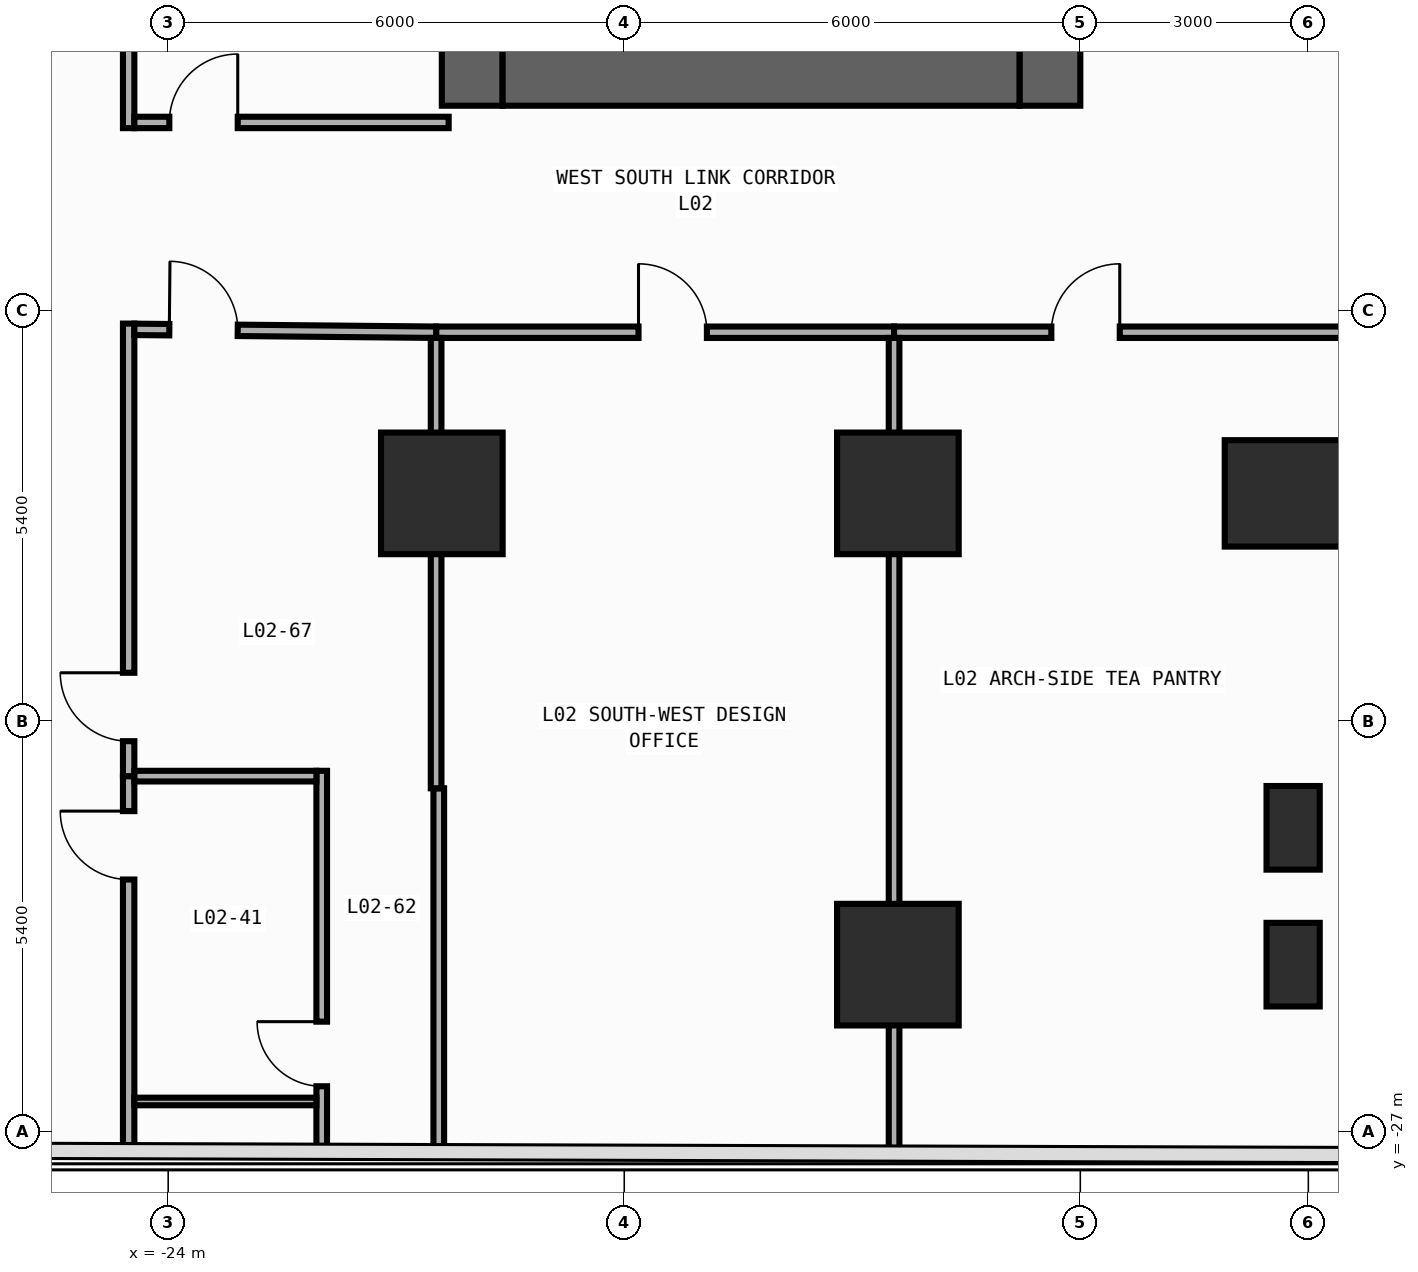
"""IFC4 building model, lengths in metres.
Left out: names, types, materials, properties, quantities, classifications, styles, units other than length and angle.
Written with IfcOpenShell. Run it as: python <this file> out.ifc"""

import sys

from ifc_helpers import new_model, si_unit, direction, frame, frame_2d, origin, origin_2d, place, context, subcontext, project, spatial, rectangle, extrude, element, fill, save


model = new_model("IFC4")
c1 = context("Model", 3, precision=1e-05, world=origin(), true_north=direction((0.0, 1.0)))
c2 = subcontext(c1, "Body", "Model", "MODEL_VIEW")
j1 = project(units=[si_unit("LENGTHUNIT", "METRE"), si_unit("PLANEANGLEUNIT", "RADIAN")], contexts=[c1])
p1 = place(None, origin())
s1 = spatial("IfcSite", under=j1, at=p1, CompositionType="ELEMENT")
p2 = place(p1, origin())
s2 = spatial("IfcBuilding", under=s1, at=p2, CompositionType="ELEMENT")
p3 = place(p2, frame((0.0, 0.0, 6.0)))
s3 = spatial("IfcBuildingStorey", under=s2, at=p3, CompositionType="ELEMENT", Elevation=6.0)
p4 = place(p3, frame((-20.0, -13.5, 0.0), z_axis=(0.0, 0.0, 1.0), x_axis=(0.0, 1.0, 0.0)))
e1 = element("IfcWall", 1, at=p4, inside=s3, PredefinedType="SHEAR", context=c2, shape_type="SweptSolid", body=[
    extrude(rectangle(XDim=27.0, YDim=0.8, at=frame_2d((13.5, 0.0))), origin(), (0.0, 0.0, 1.0), 4.7),
])
p5 = place(p3, frame((-12.4, -13.5, 0.0), z_axis=(0.0, 0.0, 1.0), x_axis=(0.0, 1.0, 0.0)))
e2 = element("IfcWall", 2, at=p5, inside=s3, PredefinedType="SHEAR", context=c2, shape_type="SweptSolid", body=[
    extrude(rectangle(XDim=27.0, YDim=0.8, at=frame_2d((13.5, 0.0))), origin(), (0.0, 0.0, 1.0), 4.7),
])
p6 = place(p5, frame((21.55, 0.0, 0.0)))
e3 = element("IfcOpeningElement", 3, at=p6, cuts=e2, PredefinedType="OPENING", context=c2, shape_type="SweptSolid", body=[
    extrude(rectangle(XDim=1.1, YDim=2.2, at=frame_2d((0.55, 1.1))), frame((0.0, 0.41, 0.0), z_axis=(0.0, -1.0, 0.0), x_axis=(1.0, 0.0, 0.0)), (0.0, 0.0, 1.0), 0.82),
])
p7 = place(p5, frame((18.35, 0.0, 0.0)))
e4 = element("IfcOpeningElement", 4, at=p7, cuts=e2, PredefinedType="OPENING", context=c2, shape_type="SweptSolid", body=[
    extrude(rectangle(XDim=1.1, YDim=2.2, at=frame_2d((0.55, 1.1))), frame((0.0, 0.41, 0.0), z_axis=(0.0, -1.0, 0.0), x_axis=(1.0, 0.0, 0.0)), (0.0, 0.0, 1.0), 0.82),
])
p8 = place(p5, frame((15.15, 0.0, 0.0)))
e5 = element("IfcOpeningElement", 5, at=p8, cuts=e2, PredefinedType="OPENING", context=c2, shape_type="SweptSolid", body=[
    extrude(rectangle(XDim=1.1, YDim=2.2, at=frame_2d((0.55, 1.1))), frame((0.0, 0.41, 0.0), z_axis=(0.0, -1.0, 0.0), x_axis=(1.0, 0.0, 0.0)), (0.0, 0.0, 1.0), 0.82),
])
p9 = place(p5, frame((10.35, 0.0, 0.0)))
e6 = element("IfcOpeningElement", 6, at=p9, cuts=e2, PredefinedType="OPENING", context=c2, shape_type="SweptSolid", body=[
    extrude(rectangle(XDim=1.1, YDim=2.2, at=frame_2d((0.55, 1.1))), frame((0.0, 0.41, 0.0), z_axis=(0.0, -1.0, 0.0), x_axis=(1.0, 0.0, 0.0)), (0.0, 0.0, 1.0), 0.82),
])
p10 = place(p5, frame((7.15, 0.0, 0.0)))
e7 = element("IfcOpeningElement", 7, at=p10, cuts=e2, PredefinedType="OPENING", context=c2, shape_type="SweptSolid", body=[
    extrude(rectangle(XDim=1.1, YDim=2.2, at=frame_2d((0.55, 1.1))), frame((0.0, 0.41, 0.0), z_axis=(0.0, -1.0, 0.0), x_axis=(1.0, 0.0, 0.0)), (0.0, 0.0, 1.0), 0.82),
])
p11 = place(p5, frame((3.95, 0.0, 0.0)))
e8 = element("IfcOpeningElement", 8, at=p11, cuts=e2, PredefinedType="OPENING", context=c2, shape_type="SweptSolid", body=[
    extrude(rectangle(XDim=1.1, YDim=2.2, at=frame_2d((0.55, 1.1))), frame((0.0, 0.41, 0.0), z_axis=(0.0, -1.0, 0.0), x_axis=(1.0, 0.0, 0.0)), (0.0, 0.0, 1.0), 0.82),
])
p12 = place(p5, frame((12.725, 0.0, 0.0)))
e9 = element("IfcOpeningElement", 9, at=p12, cuts=e2, PredefinedType="OPENING", context=c2, shape_type="SweptSolid", body=[
    extrude(rectangle(XDim=1.15, YDim=2.2, at=frame_2d((0.575, 1.1))), frame((0.0, 0.41, 0.0), z_axis=(0.0, -1.0, 0.0), x_axis=(1.0, 0.0, 0.0)), (0.0, 0.0, 1.0), 0.82),
])
p13 = place(p5, frame((1.625, 0.0, 0.0)))
e10 = element("IfcOpeningElement", 10, at=p13, cuts=e2, PredefinedType="OPENING", context=c2, shape_type="SweptSolid", body=[
    extrude(rectangle(XDim=0.85, YDim=2.1, at=frame_2d((0.425, 1.05))), frame((0.0, 0.41, 0.0), z_axis=(0.0, -1.0, 0.0), x_axis=(1.0, 0.0, 0.0)), (0.0, 0.0, 1.0), 0.82),
])
p14 = place(p3, frame((-19.6, -13.1, 0.0), z_axis=(0.0, 0.0, 1.0), x_axis=(1.0, 0.0, 0.0)))
e11 = element("IfcWall", 11, at=p14, inside=s3, PredefinedType="SHEAR", context=c2, shape_type="SweptSolid", body=[
    extrude(rectangle(XDim=6.8, YDim=0.8, at=frame_2d((3.4, 0.0))), origin(), (0.0, 0.0, 1.0), 4.7),
])
p15 = place(p3, frame((-9.2, -18.6, 0.0), z_axis=(0.0, 0.0, 1.0), x_axis=(1.0, 0.0, 0.0)))
e12 = element("IfcColumn", 12, at=p15, inside=s3, PredefinedType="COLUMN", context=c2, shape_type="SweptSolid", body=[
    extrude(rectangle(XDim=1.8, YDim=1.4, at=origin_2d()), origin(), (0.0, 0.0, 1.0), 5.0),
])
for number, where, z_axis, x_axis in (
    (13, (-20.4, -18.6, 0.0), (0.0, 0.0, 1.0), (1.0, 0.0, 0.0)),
    (14, (-14.4, -18.6, 0.0), (0.0, 0.0, 1.0), (1.0, 0.0, 0.0)),
):
    element("IfcColumn", number, at=place(p3, frame(where, z_axis=z_axis, x_axis=x_axis)), inside=s3, PredefinedType="COLUMN", context=c2, shape_type="SweptSolid", body=[
        extrude(rectangle(XDim=1.6, YDim=1.6, at=origin_2d()), origin(), (0.0, 0.0, 1.0), 5.0),
    ])
p16 = place(p3, frame((-9.2, -24.8, 0.0), z_axis=(0.0, 0.0, 1.0), x_axis=(1.0, 0.0, 0.0)))
e15 = element("IfcColumn", 15, at=p16, inside=s3, PredefinedType="PILASTER", context=c2, shape_type="SweptSolid", body=[
    extrude(rectangle(XDim=0.7, YDim=1.1, at=origin_2d()), origin(), (0.0, 0.0, 1.0), 5.0),
])
p17 = place(p3, frame((-14.4, -24.8, 0.0), z_axis=(0.0, 0.0, 1.0), x_axis=(1.0, 0.0, 0.0)))
e16 = element("IfcColumn", 16, at=p17, inside=s3, PredefinedType="COLUMN", context=c2, shape_type="SweptSolid", body=[
    extrude(rectangle(XDim=1.6, YDim=1.6, at=origin_2d()), origin(), (0.0, 0.0, 1.0), 5.0),
])
p18 = place(p3, frame((-9.2, -23.0, 0.0), z_axis=(0.0, 0.0, 1.0), x_axis=(1.0, 0.0, 0.0)))
e17 = element("IfcColumn", 17, at=p18, inside=s3, PredefinedType="PILASTER", context=c2, shape_type="SweptSolid", body=[
    extrude(rectangle(XDim=0.7, YDim=1.1, at=origin_2d()), origin(), (0.0, 0.0, 1.0), 5.0),
])
p19 = place(p3, frame((-24.52, -27.258, 0.0), z_axis=(0.0, 0.0, 1.0), x_axis=(0.0, 1.0, 0.0)))
e18 = element("IfcWall", 18, at=p19, inside=s3, PredefinedType="PARTITIONING", context=c2, shape_type="SweptSolid", body=[
    extrude(rectangle(XDim=4.938, YDim=0.15, at=frame_2d((2.469, 0.0))), origin(), (0.0, 0.0, 1.0), 4.7),
])
p20 = place(p19, frame((3.578, 0.0, 0.0)))
e19 = element("IfcOpeningElement", 19, at=p20, cuts=e18, PredefinedType="OPENING", context=c2, shape_type="SweptSolid", body=[
    extrude(rectangle(XDim=0.9, YDim=2.15, at=frame_2d((0.45, 1.075))), frame((0.0, 0.085, 0.0), z_axis=(0.0, -1.0, 0.0), x_axis=(1.0, 0.0, 0.0)), (0.0, 0.0, 1.0), 0.17),
])
p21 = place(p3, frame((-24.52, -13.795, 0.0), z_axis=(0.0, 0.0, 1.0), x_axis=(0.0, 1.0, 0.0)))
e20 = element("IfcWall", 20, at=p21, inside=s3, PredefinedType="PARTITIONING", context=c2, shape_type="SweptSolid", body=[
    extrude(rectangle(XDim=25.23, YDim=0.15, at=frame_2d((12.615, 0.0))), origin(), (0.0, 0.0, 1.0), 4.7),
])
p22 = place(p21, frame((7.863, 0.0, 0.0)))
e21 = element("IfcOpeningElement", 21, at=p22, cuts=e20, PredefinedType="OPENING", context=c2, shape_type="SweptSolid", body=[
    extrude(rectangle(XDim=0.9, YDim=2.15, at=frame_2d((0.45, 1.075))), frame((0.0, 0.085, 0.0), z_axis=(0.0, -1.0, 0.0), x_axis=(1.0, 0.0, 0.0)), (0.0, 0.0, 1.0), 0.17),
])
p23 = place(p3, frame((-24.52, -22.32, 0.0), z_axis=(0.0, 0.0, 1.0), x_axis=(0.0, 1.0, 0.0)))
e22 = element("IfcWall", 22, at=p23, inside=s3, PredefinedType="PARTITIONING", context=c2, shape_type="SweptSolid", body=[
    extrude(rectangle(XDim=5.954, YDim=0.15, at=frame_2d((2.977, 0.0))), origin(), (0.0, 0.0, 1.0), 4.7),
])
p24 = place(p23, frame((0.46, 0.0, 0.0)))
e23 = element("IfcOpeningElement", 23, at=p24, cuts=e22, PredefinedType="OPENING", context=c2, shape_type="SweptSolid", body=[
    extrude(rectangle(XDim=0.9, YDim=2.15, at=frame_2d((0.45, 1.075))), frame((0.0, 0.085, 0.0), z_axis=(0.0, -1.0, 0.0), x_axis=(1.0, 0.0, 0.0)), (0.0, 0.0, 1.0), 0.17),
])
p25 = place(p3, frame((-24.445, -13.72, 0.0), z_axis=(0.0, 0.0, 1.0), x_axis=(1.0, 0.0, 0.0)))
e24 = element("IfcWall", 24, at=p25, inside=s3, PredefinedType="PARTITIONING", context=c2, shape_type="SweptSolid", body=[
    extrude(rectangle(XDim=4.135, YDim=0.15, at=frame_2d((2.067, 0.0))), origin(), (0.0, 0.0, 1.0), 4.7),
])
p26 = place(p25, frame((0.46, 0.0, 0.0)))
e25 = element("IfcOpeningElement", 25, at=p26, cuts=e24, PredefinedType="OPENING", context=c2, shape_type="SweptSolid", body=[
    extrude(rectangle(XDim=0.9, YDim=2.15, at=frame_2d((0.45, 1.075))), frame((0.0, 0.085, 0.0), z_axis=(0.0, -1.0, 0.0), x_axis=(1.0, 0.0, 0.0)), (0.0, 0.0, 1.0), 0.17),
])
p27 = place(p3, frame((-20.475, -16.48, 0.0), z_axis=(0.0, 0.0, 1.0), x_axis=(1.0, 0.0, 0.0)))
e26 = element("IfcWall", 26, at=p27, inside=s3, PredefinedType="PARTITIONING", context=c2, shape_type="SweptSolid", body=[
    extrude(rectangle(XDim=6.025, YDim=0.15, at=frame_2d((3.013, 0.0))), origin(), (0.0, 0.0, 1.0), 4.7),
])
p28 = place(p27, frame((2.663, 0.0, 0.0)))
e27 = element("IfcOpeningElement", 27, at=p28, cuts=e26, PredefinedType="OPENING", context=c2, shape_type="SweptSolid", body=[
    extrude(rectangle(XDim=0.9, YDim=2.15, at=frame_2d((0.45, 1.075))), frame((0.0, 0.085, 0.0), z_axis=(0.0, -1.0, 0.0), x_axis=(1.0, 0.0, 0.0)), (0.0, 0.0, 1.0), 0.17),
])
p29 = place(p3, frame((-14.45, -16.48, 0.0), z_axis=(0.0, 0.0, 1.0), x_axis=(1.0, 0.0, 0.0)))
e28 = element("IfcWall", 28, at=p29, inside=s3, PredefinedType="PARTITIONING", context=c2, shape_type="SweptSolid", body=[
    extrude(rectangle(XDim=6.245, YDim=0.15, at=frame_2d((3.123, 0.0))), origin(), (0.0, 0.0, 1.0), 4.7),
])
p30 = place(p29, frame((2.069, 0.0, 0.0)))
e29 = element("IfcOpeningElement", 29, at=p30, cuts=e28, PredefinedType="OPENING", context=c2, shape_type="SweptSolid", body=[
    extrude(rectangle(XDim=0.9, YDim=2.15, at=frame_2d((0.45, 1.075))), frame((0.0, 0.085, 0.0), z_axis=(0.0, -1.0, 0.0), x_axis=(1.0, 0.0, 0.0)), (0.0, 0.0, 1.0), 0.17),
])
p31 = place(p3, frame((-24.445, -16.442, 0.0), z_axis=(0.0, 0.0, 1.0), x_axis=(0.999954573497, -0.009531576096, 0.0)))
e30 = element("IfcWall", 30, at=p31, inside=s3, PredefinedType="PARTITIONING", context=c2, shape_type="SweptSolid", body=[
    extrude(rectangle(XDim=3.97, YDim=0.15, at=frame_2d((1.985, 0.0))), origin(), (0.0, 0.0, 1.0), 4.7),
])
p32 = place(p31, frame((0.46, 0.0, 0.0)))
e31 = element("IfcOpeningElement", 31, at=p32, cuts=e30, PredefinedType="OPENING", context=c2, shape_type="SweptSolid", body=[
    extrude(rectangle(XDim=0.9, YDim=2.15, at=frame_2d((0.45, 1.075))), frame((0.0, 0.085, 0.0), z_axis=(0.0, -1.0, 0.0), x_axis=(1.0, 0.0, 0.0)), (0.0, 0.0, 1.0), 0.17),
])
p33 = place(p3, frame((-21.98, -27.266, 0.0), z_axis=(0.0, 0.0, 1.0), x_axis=(0.0, 1.0, 0.0)))
e32 = element("IfcWall", 32, at=p33, inside=s3, PredefinedType="PARTITIONING", context=c2, shape_type="SweptSolid", body=[
    extrude(rectangle(XDim=5.016, YDim=0.14, at=frame_2d((2.508, 0.0))), origin(), (0.0, 0.0, 1.0), 4.7),
])
p34 = place(p33, frame((0.866, 0.0, 0.0)))
e33 = element("IfcOpeningElement", 33, at=p34, cuts=e32, PredefinedType="OPENING", context=c2, shape_type="SweptSolid", body=[
    extrude(rectangle(XDim=0.85, YDim=2.1, at=frame_2d((0.425, 1.05))), frame((0.0, 0.08, 0.0), z_axis=(0.0, -1.0, 0.0), x_axis=(1.0, 0.0, 0.0)), (0.0, 0.0, 1.0), 0.16),
])
p35 = place(p3, frame((-24.445, -22.32, 0.0), z_axis=(0.0, 0.0, 1.0), x_axis=(1.0, 0.0, 0.0)))
e34 = element("IfcWall", 34, at=p35, inside=s3, PredefinedType="PARTITIONING", context=c2, shape_type="SweptSolid", body=[
    extrude(rectangle(XDim=2.395, YDim=0.14, at=frame_2d((1.198, 0.0))), origin(), (0.0, 0.0, 1.0), 4.7),
])
p36 = place(p3, frame((-14.45, -27.29, 0.0), z_axis=(0.0, 0.0, 1.0), x_axis=(0.0, 1.0, 0.0)))
e35 = element("IfcWall", 35, at=p36, inside=s3, PredefinedType="PARTITIONING", context=c2, shape_type="SweptSolid", body=[
    extrude(rectangle(XDim=10.735, YDim=0.14, at=frame_2d((5.367, 0.0))), origin(), (0.0, 0.0, 1.0), 3.8),
])
p37 = place(p3, frame((-20.44, -27.271, 0.0), z_axis=(0.0, 0.0, 1.0), x_axis=(0.0, 1.0, 0.0)))
e36 = element("IfcWall", 36, at=p37, inside=s3, PredefinedType="PARTITIONING", context=c2, shape_type="SweptSolid", body=[
    extrude(rectangle(XDim=4.791, YDim=0.14, at=frame_2d((2.396, 0.0))), origin(), (0.0, 0.0, 1.0), 4.7),
])
p38 = place(p3, frame((-20.475, -22.48, 0.0), z_axis=(0.0, 0.0, 1.0), x_axis=(0.0, 1.0, 0.0)))
e37 = element("IfcWall", 37, at=p38, inside=s3, PredefinedType="PARTITIONING", context=c2, shape_type="SweptSolid", body=[
    extrude(rectangle(XDim=5.925, YDim=0.14, at=frame_2d((2.962, 0.0))), origin(), (0.0, 0.0, 1.0), 4.7),
])
p39 = place(p3, frame((-22.05, -26.6, 0.0), z_axis=(0.0, 0.0, 1.0), x_axis=(-1.0, 0.0, 0.0)))
e38 = element("IfcWall", 38, at=p39, inside=s3, PredefinedType="PARTITIONING", context=c2, shape_type="SweptSolid", body=[
    extrude(rectangle(XDim=2.395, YDim=0.1, at=frame_2d((1.198, 0.0))), origin(), (0.0, 0.0, 1.0), 4.7),
])
p40 = place(p20, origin())
e39 = element("IfcDoor", 39, at=p40, inside=s3, OperationType="SINGLE_SWING_RIGHT", PredefinedType="DOOR", context=c2, shape_type="SweptSolid", body=[
    extrude(rectangle(XDim=0.9, YDim=2.15, at=frame_2d((0.45, 1.075))), frame((0.0, 0.025, 0.0), z_axis=(0.0, -1.0, 0.0), x_axis=(1.0, 0.0, 0.0)), (0.0, 0.0, 1.0), 0.05),
])
fill(e19, e39)
p41 = place(p24, origin())
e40 = element("IfcDoor", 40, at=p41, inside=s3, OperationType="SINGLE_SWING_RIGHT", PredefinedType="DOOR", context=c2, shape_type="SweptSolid", body=[
    extrude(rectangle(XDim=0.9, YDim=2.15, at=frame_2d((0.45, 1.075))), frame((0.0, 0.025, 0.0), z_axis=(0.0, -1.0, 0.0), x_axis=(1.0, 0.0, 0.0)), (0.0, 0.0, 1.0), 0.05),
])
fill(e23, e40)
p42 = place(p26, origin())
e41 = element("IfcDoor", 41, at=p42, inside=s3, OperationType="SINGLE_SWING_RIGHT", PredefinedType="DOOR", context=c2, shape_type="SweptSolid", body=[
    extrude(rectangle(XDim=0.9, YDim=2.15, at=frame_2d((0.45, 1.075))), frame((0.0, 0.025, 0.0), z_axis=(0.0, -1.0, 0.0), x_axis=(1.0, 0.0, 0.0)), (0.0, 0.0, 1.0), 0.05),
])
fill(e25, e41)
p43 = place(p28, origin())
e42 = element("IfcDoor", 42, at=p43, inside=s3, OperationType="SINGLE_SWING_LEFT", PredefinedType="DOOR", context=c2, shape_type="SweptSolid", body=[
    extrude(rectangle(XDim=0.9, YDim=2.15, at=frame_2d((0.45, 1.075))), frame((0.0, 0.025, 0.0), z_axis=(0.0, -1.0, 0.0), x_axis=(1.0, 0.0, 0.0)), (0.0, 0.0, 1.0), 0.05),
])
fill(e27, e42)
p44 = place(p30, origin())
e43 = element("IfcDoor", 43, at=p44, inside=s3, OperationType="SINGLE_SWING_RIGHT", PredefinedType="DOOR", context=c2, shape_type="SweptSolid", body=[
    extrude(rectangle(XDim=0.9, YDim=2.15, at=frame_2d((0.45, 1.075))), frame((0.0, 0.025, 0.0), z_axis=(0.0, -1.0, 0.0), x_axis=(1.0, 0.0, 0.0)), (0.0, 0.0, 1.0), 0.05),
])
fill(e29, e43)
p45 = place(p32, origin())
e44 = element("IfcDoor", 44, at=p45, inside=s3, OperationType="SINGLE_SWING_LEFT", PredefinedType="DOOR", context=c2, shape_type="SweptSolid", body=[
    extrude(rectangle(XDim=0.9, YDim=2.15, at=frame_2d((0.45, 1.075))), frame((0.0, 0.025, 0.0), z_axis=(0.0, -1.0, 0.0), x_axis=(1.0, 0.0, 0.0)), (0.0, 0.0, 1.0), 0.05),
])
fill(e31, e44)
p46 = place(p34, origin())
e45 = element("IfcDoor", 45, at=p46, inside=s3, OperationType="SINGLE_SWING_RIGHT", PredefinedType="DOOR", context=c2, shape_type="SweptSolid", body=[
    extrude(rectangle(XDim=0.85, YDim=2.1, at=frame_2d((0.425, 1.05))), frame((0.0, 0.025, 0.0), z_axis=(0.0, -1.0, 0.0), x_axis=(1.0, 0.0, 0.0)), (0.0, 0.0, 1.0), 0.05),
])
fill(e33, e45)
save(model, sys.argv[1])
